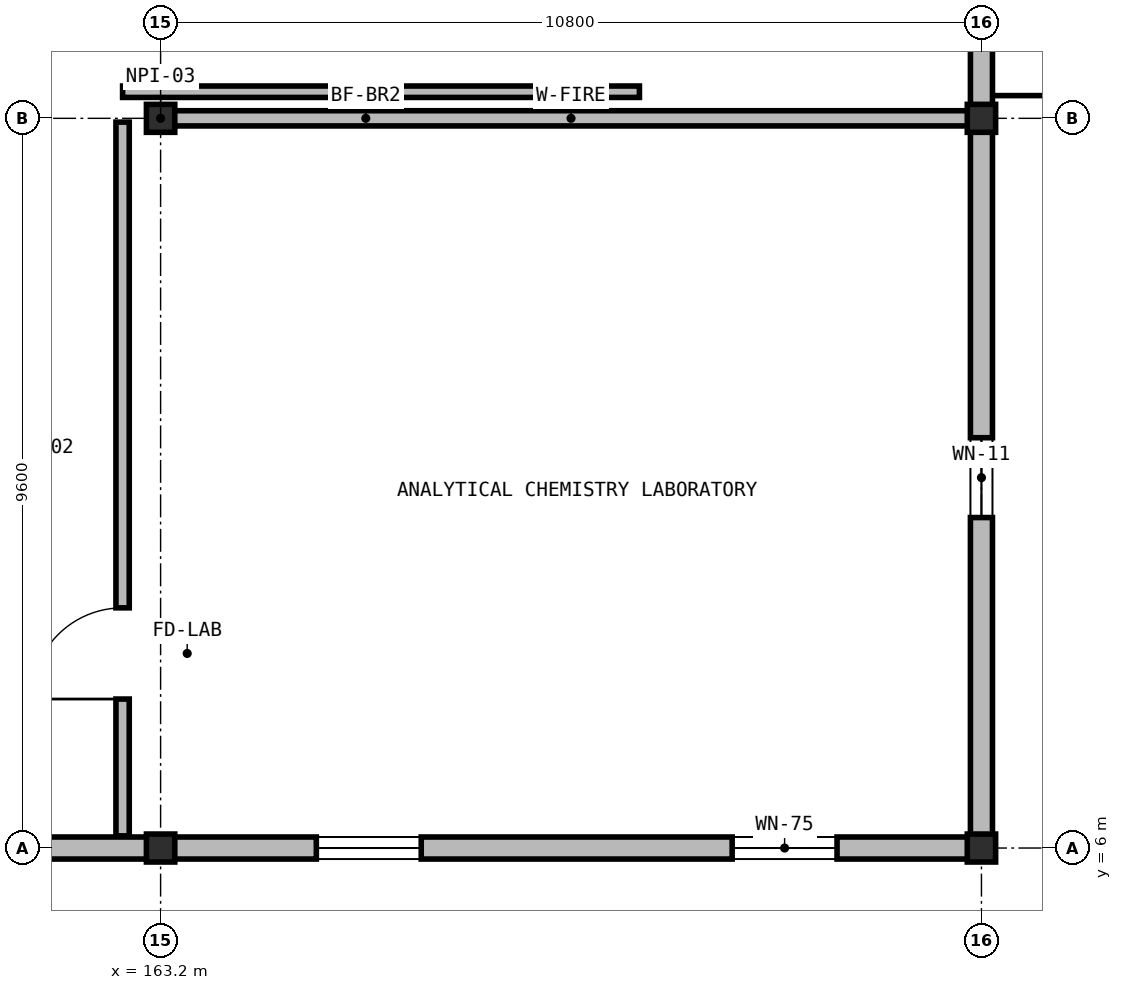
"""IFC4 building model, lengths in metres.
Left out: names, types, materials, properties, quantities, classifications, styles, units other than length and angle.
Written with IfcOpenShell. Run it as: python <this file> out.ifc"""

import sys

from ifc_helpers import new_model, si_unit, direction, frame, frame_2d, origin, origin_2d, place, context, subcontext, project, spatial, rectangle, i_section, extrude, element, fill, save


model = new_model("IFC4")
c1 = context("Model", 3, precision=1e-05, world=origin(), true_north=direction((0.0, 1.0)))
c2 = subcontext(c1, "Body", "Model", "MODEL_VIEW")
j1 = project(units=[si_unit("LENGTHUNIT", "METRE"), si_unit("PLANEANGLEUNIT", "RADIAN")], contexts=[c1])
p1 = place(None, origin())
s1 = spatial("IfcSite", under=j1, at=p1, CompositionType="ELEMENT")
p2 = place(p1, origin())
s2 = spatial("IfcBuilding", under=s1, at=p2, CompositionType="ELEMENT")
p3 = place(p2, frame((0.0, 0.0, 18.9)))
s3 = spatial("IfcBuildingStorey", under=s2, at=p3, CompositionType="ELEMENT", Elevation=18.9)
for number, where, z_axis, x_axis in (
    (1, (163.2, 6.0, 0.0), (0.0, 0.0, 1.0), (1.0, 0.0, 0.0)),
    (2, (163.2, 15.6, 0.0), (0.0, 0.0, 1.0), (1.0, 0.0, 0.0)),
    (3, (174.0, 6.0, 0.0), (0.0, 0.0, 1.0), (1.0, 0.0, 0.0)),
    (4, (174.0, 15.6, 0.0), (0.0, 0.0, 1.0), (1.0, 0.0, 0.0)),
):
    element("IfcColumn", number, at=place(p3, frame(where, z_axis=z_axis, x_axis=x_axis)), inside=s3, PredefinedType="COLUMN", context=c2, shape_type="SweptSolid", body=[
        extrude(i_section(OverallWidth=0.373, OverallDepth=0.368, WebThickness=0.017, FlangeThickness=0.027, at=origin_2d()), origin(), (0.0, 0.0, 1.0), 4.55),
    ])
p4 = place(p3, frame((174.0, 25.196, 0.0), z_axis=(0.0, 0.0, 1.0), x_axis=(0.0, -1.0, 0.0)))
e5 = element("IfcWall", 5, at=p4, inside=s3, PredefinedType="SOLIDWALL", context=c2, shape_type="SweptSolid", body=[
    extrude(rectangle(XDim=9.592, YDim=0.29, at=frame_2d((4.796, 0.0))), origin(), (0.0, 0.0, 1.0), 3.884),
])
p5 = place(p4, frame((3.556, 0.0, 0.95)))
e6 = element("IfcOpeningElement", 6, at=p5, cuts=e5, PredefinedType="OPENING", context=c2, shape_type="SweptSolid", body=[
    extrude(rectangle(XDim=2.48, YDim=1.72, at=frame_2d((1.24, 0.86))), frame((0.0, 0.155, 0.0), z_axis=(0.0, -1.0, 0.0), x_axis=(1.0, 0.0, 0.0)), (0.0, 0.0, 1.0), 0.31),
])
p6 = place(p3, frame((174.0, 15.596, 0.0), z_axis=(0.0, 0.0, 1.0), x_axis=(0.0, -1.0, 0.0)))
e7 = element("IfcWall", 7, at=p6, inside=s3, PredefinedType="SOLIDWALL", context=c2, shape_type="SweptSolid", body=[
    extrude(rectangle(XDim=9.447, YDim=0.29, at=frame_2d((4.724, 0.0))), origin(), (0.0, 0.0, 1.0), 3.884),
])
p7 = place(p6, frame((4.198, 0.0, 0.95)))
e8 = element("IfcOpeningElement", 8, at=p7, cuts=e7, PredefinedType="OPENING", context=c2, shape_type="SweptSolid", body=[
    extrude(rectangle(XDim=1.05, YDim=1.64, at=frame_2d((0.525, 0.82))), frame((0.0, 0.155, 0.0), z_axis=(0.0, -1.0, 0.0), x_axis=(1.0, 0.0, 0.0)), (0.0, 0.0, 1.0), 0.31),
])
p8 = place(p3, frame((174.145, 6.0, 0.0), z_axis=(0.0, 0.0, 1.0), x_axis=(-1.0, 0.0, 0.0)))
e9 = element("IfcWall", 9, at=p8, inside=s3, PredefinedType="SOLIDWALL", context=c2, shape_type="SweptSolid", body=[
    extrude(rectangle(XDim=10.941, YDim=0.29, at=frame_2d((5.47, 0.0))), origin(), (0.0, 0.0, 1.0), 3.816),
])
p9 = place(p8, frame((2.045, 0.0, 0.95)))
e10 = element("IfcOpeningElement", 10, at=p9, cuts=e9, PredefinedType="OPENING", context=c2, shape_type="SweptSolid", body=[
    extrude(rectangle(XDim=1.38, YDim=1.56, at=frame_2d((0.69, 0.78))), frame((0.0, 0.155, 0.0), z_axis=(0.0, -1.0, 0.0), x_axis=(1.0, 0.0, 0.0)), (0.0, 0.0, 1.0), 0.31),
])
p10 = place(p8, frame((7.516, 0.0, 0.95)))
e11 = element("IfcOpeningElement", 11, at=p10, cuts=e9, PredefinedType="OPENING", context=c2, shape_type="SweptSolid", body=[
    extrude(rectangle(XDim=1.38, YDim=1.56, at=frame_2d((0.69, 0.78))), frame((0.0, 0.155, 0.0), z_axis=(0.0, -1.0, 0.0), x_axis=(1.0, 0.0, 0.0)), (0.0, 0.0, 1.0), 0.31),
])
p11 = place(p3, frame((163.196, 6.0, 0.0), z_axis=(0.0, 0.0, 1.0), x_axis=(-1.0, 0.0, 0.0)))
e12 = element("IfcWall", 12, at=p11, inside=s3, PredefinedType="SOLIDWALL", context=c2, shape_type="SweptSolid", body=[
    extrude(rectangle(XDim=9.741, YDim=0.29, at=frame_2d((4.871, 0.0))), origin(), (0.0, 0.0, 1.0), 3.884),
])
p12 = place(p11, frame((6.286, 0.0, 0.95)))
e13 = element("IfcOpeningElement", 13, at=p12, cuts=e12, PredefinedType="OPENING", context=c2, shape_type="SweptSolid", body=[
    extrude(rectangle(XDim=2.04, YDim=1.4, at=frame_2d((1.02, 0.7))), frame((0.0, 0.155, 0.0), z_axis=(0.0, -1.0, 0.0), x_axis=(1.0, 0.0, 0.0)), (0.0, 0.0, 1.0), 0.31),
])
p13 = place(p3, frame((163.36, 15.6, 0.0), z_axis=(0.0, 0.0, 1.0), x_axis=(1.0, 0.0, 0.0)))
e14 = element("IfcWall", 14, at=p13, inside=s3, PredefinedType="SOLIDWALL", context=c2, shape_type="SweptSolid", body=[
    extrude(rectangle(XDim=10.48, YDim=0.2, at=frame_2d((5.24, 0.0))), origin(), (0.0, 0.0, 1.0), 3.739),
])
p14 = place(p3, frame((162.7, 6.16, 0.0), z_axis=(0.0, 0.0, 1.0), x_axis=(0.0, 1.0, 0.0)))
e15 = element("IfcWall", 15, at=p14, inside=s3, PredefinedType="PARTITIONING", context=c2, shape_type="SweptSolid", body=[
    extrude(rectangle(XDim=9.39, YDim=0.175, at=frame_2d((4.695, 0.0))), origin(), (0.0, 0.0, 1.0), 4.3),
])
p15 = place(p14, frame((1.8, 0.0, 0.0)))
e16 = element("IfcOpeningElement", 16, at=p15, cuts=e15, PredefinedType="OPENING", context=c2, shape_type="SweptSolid", body=[
    extrude(rectangle(XDim=1.2, YDim=2.2, at=frame_2d((0.6, 1.1))), frame((0.0, 0.097, 0.0), z_axis=(0.0, -1.0, 0.0), x_axis=(1.0, 0.0, 0.0)), (0.0, 0.0, 1.0), 0.195),
])
p16 = place(p3, frame((162.7, 15.95, 0.0), z_axis=(0.0, 0.0, 1.0), x_axis=(1.0, 0.0, 0.0)))
e17 = element("IfcWall", 17, at=p16, inside=s3, PredefinedType="PARTITIONING", context=c2, shape_type="SweptSolid", body=[
    extrude(rectangle(XDim=6.8, YDim=0.15, at=frame_2d((3.4, 0.0))), origin(), (0.0, 0.0, 1.0), 4.3),
])
p17 = place(p7, origin())
e18 = element("IfcWindow", 18, at=p17, inside=s3, PartitioningType="SINGLE_PANEL", PredefinedType="WINDOW", context=c2, shape_type="SweptSolid", body=[
    extrude(rectangle(XDim=1.05, YDim=1.64, at=frame_2d((0.525, 0.82))), frame((0.0, 0.03, 0.0), z_axis=(0.0, -1.0, 0.0), x_axis=(1.0, 0.0, 0.0)), (0.0, 0.0, 1.0), 0.06),
])
fill(e8, e18)
p18 = place(p9, origin())
e19 = element("IfcWindow", 19, at=p18, inside=s3, PartitioningType="SINGLE_PANEL", PredefinedType="WINDOW", context=c2, shape_type="SweptSolid", body=[
    extrude(rectangle(XDim=1.38, YDim=1.56, at=frame_2d((0.69, 0.78))), frame((0.0, 0.03, 0.0), z_axis=(0.0, -1.0, 0.0), x_axis=(1.0, 0.0, 0.0)), (0.0, 0.0, 1.0), 0.06),
])
fill(e10, e19)
p19 = place(p10, origin())
e20 = element("IfcWindow", 20, at=p19, inside=s3, PartitioningType="SINGLE_PANEL", PredefinedType="WINDOW", context=c2, shape_type="SweptSolid", body=[
    extrude(rectangle(XDim=1.38, YDim=1.56, at=frame_2d((0.69, 0.78))), frame((0.0, 0.03, 0.0), z_axis=(0.0, -1.0, 0.0), x_axis=(1.0, 0.0, 0.0)), (0.0, 0.0, 1.0), 0.06),
])
fill(e11, e20)
p20 = place(p15, origin())
e21 = element("IfcDoor", 21, at=p20, inside=s3, OperationType="SINGLE_SWING_LEFT", PredefinedType="DOOR", context=c2, shape_type="SweptSolid", body=[
    extrude(rectangle(XDim=1.2, YDim=2.2, at=frame_2d((0.6, 1.1))), frame((0.0, 0.025, 0.0), z_axis=(0.0, -1.0, 0.0), x_axis=(1.0, 0.0, 0.0)), (0.0, 0.0, 1.0), 0.05),
])
fill(e16, e21)
save(model, sys.argv[1])
